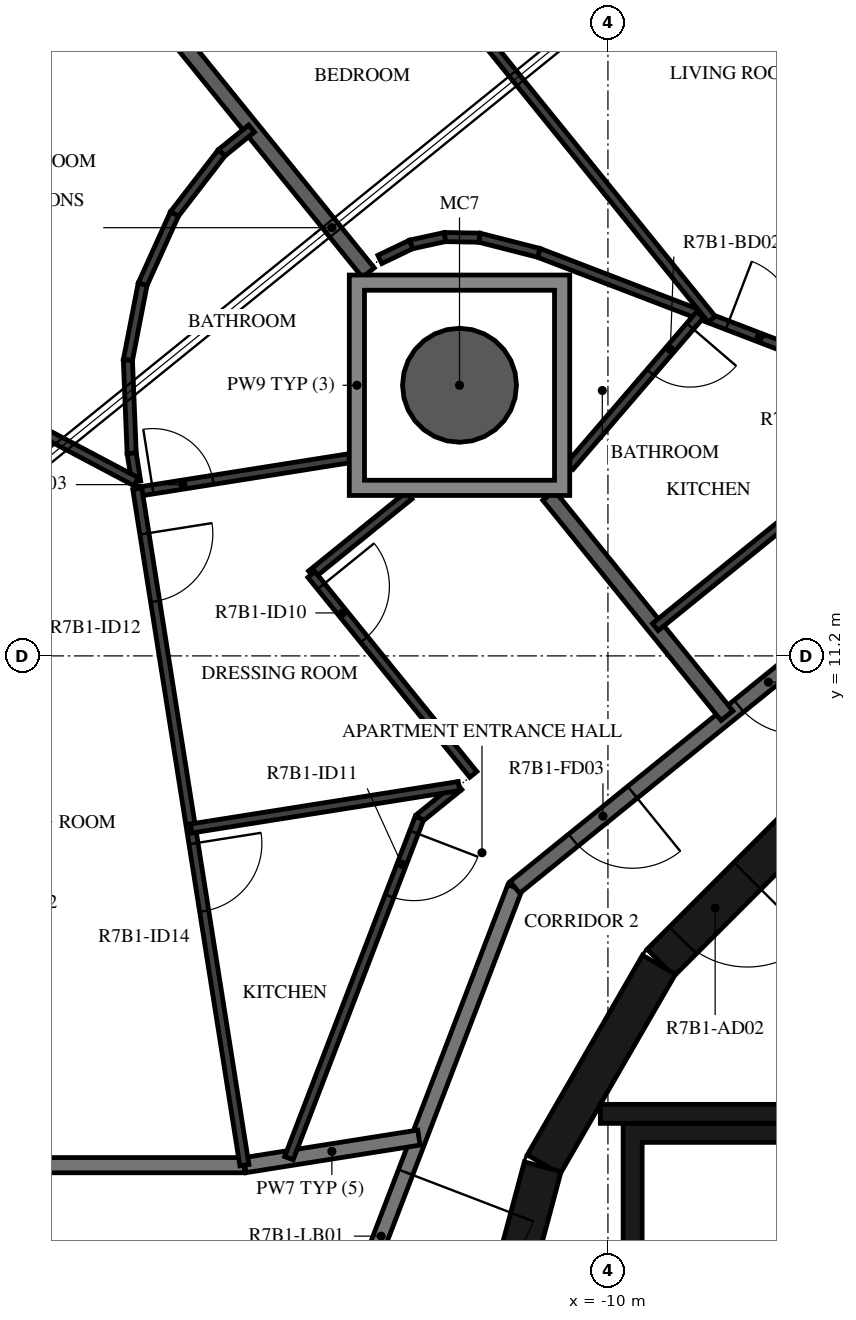
"""IFC4 building model, lengths in metres.
Left out: names, types, materials, properties, quantities, classifications, styles, units other than length and angle.
Written with IfcOpenShell. Run it as: python <this file> out.ifc"""

import sys

from ifc_helpers import new_model, si_unit, direction, frame, frame_2d, origin, origin_2d, place, context, subcontext, project, spatial, polyline, rectangle, hollow_circle, outline, extrude, element, fill, save


model = new_model("IFC4")
c1 = context("Model", 3, precision=1e-05, world=origin(), true_north=direction((0.0, 1.0)))
c2 = subcontext(c1, "Body", "Model", "MODEL_VIEW")
j1 = project(units=[si_unit("LENGTHUNIT", "METRE"), si_unit("PLANEANGLEUNIT", "RADIAN")], contexts=[c1])
p1 = place(None, origin())
s1 = spatial("IfcSite", under=j1, at=p1, CompositionType="ELEMENT")
p2 = place(p1, origin())
s2 = spatial("IfcBuilding", under=s1, at=p2, CompositionType="ELEMENT")
p3 = place(p2, frame((0.0, 0.0, 273.9)))
s3 = spatial("IfcBuildingStorey", under=s2, at=p3, CompositionType="ELEMENT", Elevation=273.9)
p4 = place(p3, frame((-11.953, 14.76, -0.38), z_axis=(0.0, 0.0, 1.0), x_axis=(1.0, 0.0, 0.0)))
e1 = element("IfcColumn", 1, at=p4, inside=s3, PredefinedType="COLUMN", context=c2, shape_type="SweptSolid", body=[
    extrude(hollow_circle(Radius=0.75, WallThickness=0.035, at=origin_2d()), origin(), (0.0, 0.0, 1.0), 3.5),
])
p5 = place(p3, frame((-7.164, 9.308, 0.0), z_axis=(0.0, 0.0, 1.0), x_axis=(-0.707106781187, -0.707106781187, 0.0)))
e2 = element("IfcWall", 2, at=p5, inside=s3, PredefinedType="SHEAR", context=c2, shape_type="SweptSolid", body=[
    extrude(rectangle(XDim=3.032, YDim=0.5, at=frame_2d((1.516, 0.0))), origin(), (0.0, 0.0, 1.0), 3.12),
])
p6 = place(p5, frame((1.416, 0.0, 0.0)))
e3 = element("IfcOpeningElement", 3, at=p6, cuts=e2, PredefinedType="OPENING", context=c2, shape_type="SweptSolid", body=[
    extrude(rectangle(XDim=1.2, YDim=2.1, at=frame_2d((0.6, 1.05))), frame((0.0, 0.26, 0.0), z_axis=(0.0, -1.0, 0.0), x_axis=(1.0, 0.0, 0.0)), (0.0, 0.0, 1.0), 0.52),
])
for number, where, z_axis, x_axis in (
    (4, (-9.329, 7.137, 0.0), (0.0, 0.0, 1.0), (-0.5, -0.866, 0.0)),
    (5, (-10.858, 4.479, 0.0), (0.0, 0.0, 1.0), (-0.259, -0.966, 0.0)),
):
    element("IfcWall", number, at=place(p3, frame(where, z_axis=z_axis, x_axis=x_axis)), inside=s3, PredefinedType="SHEAR", context=c2, shape_type="SweptSolid", body=[
        extrude(rectangle(XDim=3.033, YDim=0.5, at=frame_2d((1.516, 0.0))), origin(), (0.0, 0.0, 1.0), 3.12),
    ])
p7 = place(p3, frame((-7.0, 5.175, 0.0), z_axis=(0.0, 0.0, 1.0), x_axis=(-1.0, 0.0, 0.0)))
e6 = element("IfcWall", 6, at=p7, inside=s3, PredefinedType="SHEAR", context=c2, shape_type="SweptSolid", body=[
    extrude(rectangle(XDim=3.1, YDim=0.25, at=frame_2d((1.55, 0.0))), origin(), (0.0, 0.0, 1.0), 3.12),
])
p8 = place(p3, origin())
e7 = element("IfcWall", 7, at=p8, inside=s3, PredefinedType="SHEAR", context=c2, shape_type="SweptSolid", body=[
    extrude(outline(polyline([(-9.8, 1.9), (-9.55, 1.9), (-9.55, 4.8), (-5.5, 4.8), (-5.5, 1.9), (-5.25, 1.9), (-5.25, 4.8), (3.1, 4.8), (3.1, 1.9), (3.35, 1.9), (3.35, 4.8), (5.25, 4.8), (5.25, 1.9), (5.5, 1.9), (5.5, 4.8), (7.4, 4.8), (7.4, 1.9), (7.65, 1.9), (7.65, 4.8), (9.55, 4.8), (9.55, 1.9), (9.8, 1.9), (9.8, 4.8), (9.8, 5.05), (-9.8, 5.05), (-9.8, 4.8), (-9.8, 1.9)])), origin(), (0.0, 0.0, 1.0), 3.12),
])
p9 = place(p3, frame((-11.223, 8.154, 0.0), z_axis=(0.0, 0.0, 1.0), x_axis=(-0.358341090983, -0.93359073609, 0.0)))
e8 = element("IfcWall", 8, at=p9, inside=s3, PredefinedType="STANDARD", context=c2, shape_type="SweptSolid", body=[
    extrude(rectangle(XDim=7.181, YDim=0.2, at=frame_2d((3.59, 0.0))), origin(), (0.0, 0.0, 1.0), 3.12),
])
p10 = place(p9, frame((4.014, 0.0, 0.0)))
e9 = element("IfcOpeningElement", 9, at=p10, cuts=e8, PredefinedType="OPENING", context=c2, shape_type="SweptSolid", body=[
    extrude(rectangle(XDim=1.8, YDim=2.1, at=frame_2d((0.9, 1.05))), frame((0.0, 0.11, 0.0), z_axis=(0.0, -1.0, 0.0), x_axis=(1.0, 0.0, 0.0)), (0.0, 0.0, 1.0), 0.22),
])
p11 = place(p3, frame((-5.643, 12.673, 0.0), z_axis=(0.0, 0.0, 1.0), x_axis=(-0.777160148113, -0.629302871585, 0.0)))
e10 = element("IfcWall", 10, at=p11, inside=s3, PredefinedType="STANDARD", context=c2, shape_type="SweptSolid", body=[
    extrude(rectangle(XDim=7.181, YDim=0.2, at=frame_2d((3.59, 0.0))), origin(), (0.0, 0.0, 1.0), 3.12),
])
p12 = place(p11, frame((2.39, 0.0, 0.0)))
e11 = element("IfcOpeningElement", 11, at=p12, cuts=e10, PredefinedType="OPENING", context=c2, shape_type="SweptSolid", body=[
    extrude(rectangle(XDim=1.0, YDim=2.1, at=frame_2d((0.5, 1.05))), frame((0.0, 0.11, 0.0), z_axis=(0.0, -1.0, 0.0), x_axis=(1.0, 0.0, 0.0)), (0.0, 0.0, 1.0), 0.22),
])
p13 = place(p11, frame((5.192, 0.0, 0.0)))
e12 = element("IfcOpeningElement", 12, at=p13, cuts=e10, PredefinedType="OPENING", context=c2, shape_type="SweptSolid", body=[
    extrude(rectangle(XDim=1.0, YDim=2.1, at=frame_2d((0.5, 1.05))), frame((0.0, 0.11, 0.0), z_axis=(0.0, -1.0, 0.0), x_axis=(1.0, 0.0, 0.0)), (0.0, 0.0, 1.0), 0.22),
])
p14 = place(p3, frame((-12.487, 4.863, 0.0), z_axis=(0.0, 0.0, 1.0), x_axis=(-0.98769031179, -0.156422018898, 0.0)))
e13 = element("IfcWall", 13, at=p14, inside=s3, PredefinedType="STANDARD", context=c2, shape_type="SweptSolid", body=[
    extrude(rectangle(XDim=2.319, YDim=0.2, at=frame_2d((1.16, 0.0))), origin(), (0.0, 0.0, 1.0), 3.12),
])
p15 = place(p3, frame((-14.783, 4.5, 0.0), z_axis=(0.0, 0.0, 1.0), x_axis=(-1.0, 0.0, 0.0)))
e14 = element("IfcWall", 14, at=p15, inside=s3, PredefinedType="STANDARD", context=c2, shape_type="SweptSolid", body=[
    extrude(rectangle(XDim=3.645, YDim=0.2, at=frame_2d((1.822, 0.0))), origin(), (0.0, 0.0, 1.0), 3.12),
])
p16 = place(p3, frame((-10.779, 13.31, 0.0), z_axis=(0.0, 0.0, 1.0), x_axis=(0.62931692753, -0.777148766147, 0.0)))
e15 = element("IfcWall", 15, at=p16, inside=s3, PredefinedType="STANDARD", context=c2, shape_type="SweptSolid", body=[
    extrude(rectangle(XDim=3.727, YDim=0.2, at=frame_2d((1.864, 0.0))), origin(), (0.0, 0.0, 1.0), 3.12),
])
p17 = place(p3, frame((-16.953, 20.936, 0.0), z_axis=(0.0, 0.0, 1.0), x_axis=(0.629347053134, -0.77712437017, 0.0)))
e16 = element("IfcWall", 16, at=p17, inside=s3, PredefinedType="STANDARD", context=c2, shape_type="SweptSolid", body=[
    extrude(rectangle(XDim=6.04, YDim=0.2, at=frame_2d((3.02, 0.0))), origin(), (0.0, 0.0, 1.0), 3.12),
])
p18 = place(p3, frame((-6.274, 14.092, 0.0), z_axis=(0.0, 0.0, 1.0), x_axis=(-0.777162268892, -0.629300252511, 0.0)))
e17 = element("IfcWall", 17, at=p18, inside=s3, PredefinedType="PARTITIONING", context=c2, shape_type="SweptSolid", body=[
    extrude(rectangle(XDim=3.992, YDim=0.12, at=frame_2d((1.996, 0.0))), origin(), (0.0, 0.0, 1.0), 3.12),
])
p19 = place(p18, frame((0.2, 0.0, 0.0)))
e18 = element("IfcOpeningElement", 18, at=p19, cuts=e17, PredefinedType="OPENING", context=c2, shape_type="SweptSolid", body=[
    extrude(rectangle(XDim=0.9, YDim=2.1, at=frame_2d((0.45, 1.05))), frame((0.0, 0.07, 0.0), z_axis=(0.0, -1.0, 0.0), x_axis=(1.0, 0.0, 0.0)), (0.0, 0.0, 1.0), 0.14),
])
p20 = place(p3, frame((-10.91, 16.502, 0.0), z_axis=(0.0, 0.0, 1.0), x_axis=(0.933584453869, -0.358357457707, 0.0)))
e19 = element("IfcWall", 19, at=p20, inside=s3, PredefinedType="PARTITIONING", context=c2, shape_type="SweptSolid", body=[
    extrude(rectangle(XDim=6.212, YDim=0.12, at=frame_2d((3.106, 0.0))), origin(), (0.0, 0.0, 1.0), 3.12),
])
p21 = place(p20, frame((2.657, 0.0, 0.0)))
e20 = element("IfcOpeningElement", 20, at=p21, cuts=e19, PredefinedType="OPENING", context=c2, shape_type="SweptSolid", body=[
    extrude(rectangle(XDim=0.9, YDim=2.1, at=frame_2d((0.45, 1.05))), frame((0.0, 0.07, 0.0), z_axis=(0.0, -1.0, 0.0), x_axis=(1.0, 0.0, 0.0)), (0.0, 0.0, 1.0), 0.14),
])
p22 = place(p3, frame((-14.132, 22.418, 0.0), z_axis=(0.0, 0.0, 1.0), x_axis=(0.629309172704, -0.77715504576, 0.0)))
e21 = element("IfcWall", 21, at=p22, inside=s3, PredefinedType="PARTITIONING", context=c2, shape_type="SweptSolid", body=[
    extrude(rectangle(XDim=8.736, YDim=0.12, at=frame_2d((4.368, 0.0))), origin(), (0.0, 0.0, 1.0), 3.12),
])
p23 = place(p22, frame((0.4, 0.0, 0.0)))
e22 = element("IfcOpeningElement", 22, at=p23, cuts=e21, PredefinedType="OPENING", context=c2, shape_type="SweptSolid", body=[
    extrude(rectangle(XDim=0.9, YDim=2.1, at=frame_2d((0.45, 1.05))), frame((0.0, 0.07, 0.0), z_axis=(0.0, -1.0, 0.0), x_axis=(1.0, 0.0, 0.0)), (0.0, 0.0, 1.0), 0.14),
])
p24 = place(p3, frame((-8.788, 15.688, 0.0), z_axis=(0.0, 0.0, 1.0), x_axis=(-0.652090514391, -0.758141122115, 0.0)))
e23 = element("IfcWall", 23, at=p24, inside=s3, PredefinedType="PARTITIONING", context=c2, shape_type="SweptSolid", body=[
    extrude(rectangle(XDim=2.629, YDim=0.12, at=frame_2d((1.314, 0.0))), origin(), (0.0, 0.0, 1.0), 3.12),
])
p25 = place(p24, frame((0.2, 0.0, 0.0)))
e24 = element("IfcOpeningElement", 24, at=p25, cuts=e23, PredefinedType="OPENING", context=c2, shape_type="SweptSolid", body=[
    extrude(rectangle(XDim=0.8, YDim=2.1, at=frame_2d((0.4, 1.05))), frame((0.0, 0.07, 0.0), z_axis=(0.0, -1.0, 0.0), x_axis=(1.0, 0.0, 0.0)), (0.0, 0.0, 1.0), 0.14),
])
p26 = place(p3, frame((-10.91, 16.502, 0.0), z_axis=(0.0, 0.0, 1.0), x_axis=(-0.96886520615, 0.247588796823, 0.0)))
e25 = element("IfcWall", 25, at=p26, inside=s3, PredefinedType="PARTITIONING", context=c2, shape_type="SweptSolid", body=[
    extrude(rectangle(XDim=0.807, YDim=0.12, at=frame_2d((0.403, 0.0))), origin(), (0.0, 0.0, 1.0), 3.12),
])
p27 = place(p3, frame((-11.691, 16.702, 0.0), z_axis=(0.0, 0.0, 1.0), x_axis=(-0.999843155249, 0.017710587291, 0.0)))
e26 = element("IfcWall", 26, at=p27, inside=s3, PredefinedType="PARTITIONING", context=c2, shape_type="SweptSolid", body=[
    extrude(rectangle(XDim=0.455, YDim=0.12, at=frame_2d((0.228, 0.0))), origin(), (0.0, 0.0, 1.0), 3.12),
])
p28 = place(p3, frame((-12.146, 16.71, 0.0), z_axis=(0.0, 0.0, 1.0), x_axis=(-0.976826470165, -0.21403281801, 0.0)))
e27 = element("IfcWall", 27, at=p28, inside=s3, PredefinedType="PARTITIONING", context=c2, shape_type="SweptSolid", body=[
    extrude(rectangle(XDim=0.455, YDim=0.12, at=frame_2d((0.228, 0.0))), origin(), (0.0, 0.0, 1.0), 3.12),
])
p29 = place(p3, frame((-12.591, 16.613, 0.0), z_axis=(0.0, 0.0, 1.0), x_axis=(-0.901405666701, -0.432975546699, 0.0)))
e28 = element("IfcWall", 28, at=p29, inside=s3, PredefinedType="PARTITIONING", context=c2, shape_type="SweptSolid", body=[
    extrude(rectangle(XDim=0.455, YDim=0.12, at=frame_2d((0.227, 0.0))), origin(), (0.0, 0.0, 1.0), 3.12),
])
p30 = place(p3, frame((-12.616, 13.311, 0.0), z_axis=(0.0, 0.0, 1.0), x_axis=(-0.7771657422, -0.629295963082, 0.0)))
e29 = element("IfcWall", 29, at=p30, inside=s3, PredefinedType="PARTITIONING", context=c2, shape_type="SweptSolid", body=[
    extrude(rectangle(XDim=1.653, YDim=0.12, at=frame_2d((0.826, 0.0))), origin(), (0.0, 0.0, 1.0), 3.12),
])
p31 = place(p3, frame((-13.901, 12.271, 0.0), z_axis=(0.0, 0.0, 1.0), x_axis=(0.62932066967, -0.777145735835, 0.0)))
e30 = element("IfcWall", 30, at=p31, inside=s3, PredefinedType="PARTITIONING", context=c2, shape_type="SweptSolid", body=[
    extrude(rectangle(XDim=3.384, YDim=0.12, at=frame_2d((1.692, 0.0))), origin(), (0.0, 0.0, 1.0), 3.12),
])
p32 = place(p31, frame((0.2, 0.0, 0.0)))
e31 = element("IfcOpeningElement", 31, at=p32, cuts=e30, PredefinedType="OPENING", context=c2, shape_type="SweptSolid", body=[
    extrude(rectangle(XDim=0.9, YDim=2.1, at=frame_2d((0.45, 1.05))), frame((0.0, 0.07, 0.0), z_axis=(0.0, -1.0, 0.0), x_axis=(1.0, 0.0, 0.0)), (0.0, 0.0, 1.0), 0.14),
])
p33 = place(p3, frame((-11.96, 9.487, 0.0), z_axis=(0.0, 0.0, 1.0), x_axis=(-0.777219341678, -0.62922976322, 0.0)))
e32 = element("IfcWall", 32, at=p33, inside=s3, PredefinedType="PARTITIONING", context=c2, shape_type="SweptSolid", body=[
    extrude(rectangle(XDim=0.668, YDim=0.12, at=frame_2d((0.334, 0.0))), origin(), (0.0, 0.0, 1.0), 3.12),
])
p34 = place(p3, frame((-12.479, 9.067, 0.0), z_axis=(0.0, 0.0, 1.0), x_axis=(-0.358402229057, -0.933567267104, 0.0)))
e33 = element("IfcWall", 33, at=p34, inside=s3, PredefinedType="PARTITIONING", context=c2, shape_type="SweptSolid", body=[
    extrude(rectangle(XDim=4.793, YDim=0.12, at=frame_2d((2.397, 0.0))), origin(), (0.0, 0.0, 1.0), 3.12),
])
p35 = place(p34, frame((0.2, 0.0, 0.0)))
e34 = element("IfcOpeningElement", 34, at=p35, cuts=e33, PredefinedType="OPENING", context=c2, shape_type="SweptSolid", body=[
    extrude(rectangle(XDim=0.9, YDim=2.1, at=frame_2d((0.45, 1.05))), frame((0.0, 0.07, 0.0), z_axis=(0.0, -1.0, 0.0), x_axis=(1.0, 0.0, 0.0)), (0.0, 0.0, 1.0), 0.14),
])
p36 = place(p3, frame((-14.688, 18.138, 0.0), z_axis=(0.0, 0.0, 1.0), x_axis=(-0.777009819755, -0.629488474879, 0.0)))
e35 = element("IfcWall", 35, at=p36, inside=s3, PredefinedType="PARTITIONING", context=c2, shape_type="SweptSolid", body=[
    extrude(rectangle(XDim=0.508, YDim=0.12, at=frame_2d((0.254, 0.0))), origin(), (0.0, 0.0, 1.0), 3.12),
])
p37 = place(p3, frame((-15.083, 17.818, 0.0), z_axis=(0.0, 0.0, 1.0), x_axis=(-0.611091802574, -0.791559731686, 0.0)))
e36 = element("IfcWall", 36, at=p37, inside=s3, PredefinedType="PARTITIONING", context=c2, shape_type="SweptSolid", body=[
    extrude(rectangle(XDim=1.016, YDim=0.12, at=frame_2d((0.508, 0.0))), origin(), (0.0, 0.0, 1.0), 3.12),
])
p38 = place(p3, frame((-15.703, 17.014, 0.0), z_axis=(0.0, 0.0, 1.0), x_axis=(-0.411973085874, -0.911196014322, 0.0)))
e37 = element("IfcWall", 37, at=p38, inside=s3, PredefinedType="PARTITIONING", context=c2, shape_type="SweptSolid", body=[
    extrude(rectangle(XDim=1.016, YDim=0.12, at=frame_2d((0.508, 0.0))), origin(), (0.0, 0.0, 1.0), 3.12),
])
p39 = place(p3, frame((-16.122, 16.088, 0.0), z_axis=(0.0, 0.0, 1.0), x_axis=(-0.191030445301, -0.981584112019, 0.0)))
e38 = element("IfcWall", 38, at=p39, inside=s3, PredefinedType="PARTITIONING", context=c2, shape_type="SweptSolid", body=[
    extrude(rectangle(XDim=1.016, YDim=0.12, at=frame_2d((0.508, 0.0))), origin(), (0.0, 0.0, 1.0), 3.12),
])
p40 = place(p3, frame((-16.316, 15.091, 0.0), z_axis=(0.0, 0.0, 1.0), x_axis=(0.040786423131, -0.999167887639, 0.0)))
e39 = element("IfcWall", 39, at=p40, inside=s3, PredefinedType="PARTITIONING", context=c2, shape_type="SweptSolid", body=[
    extrude(rectangle(XDim=1.227, YDim=0.12, at=frame_2d((0.614, 0.0))), origin(), (0.0, 0.0, 1.0), 3.12),
])
p41 = place(p3, frame((-16.266, 13.865, 0.0), z_axis=(0.0, 0.0, 1.0), x_axis=(0.156757556272, -0.987637113798, 0.0)))
e40 = element("IfcWall", 40, at=p41, inside=s3, PredefinedType="PARTITIONING", context=c2, shape_type="SweptSolid", body=[
    extrude(rectangle(XDim=0.378, YDim=0.12, at=frame_2d((0.189, 0.0))), origin(), (0.0, 0.0, 1.0), 3.12),
])
p42 = place(p3, frame((-16.186, 13.359, 0.0), z_axis=(0.0, 0.0, 1.0), x_axis=(0.987680631298, 0.156483131865, 0.0)))
e41 = element("IfcWall", 41, at=p42, inside=s3, PredefinedType="PARTITIONING", context=c2, shape_type="SweptSolid", body=[
    extrude(rectangle(XDim=2.818, YDim=0.12, at=frame_2d((1.409, 0.0))), origin(), (0.0, 0.0, 1.0), 3.12),
])
p43 = place(p42, frame((0.2, 0.0, 0.0)))
e42 = element("IfcOpeningElement", 42, at=p43, cuts=e41, PredefinedType="OPENING", context=c2, shape_type="SweptSolid", body=[
    extrude(rectangle(XDim=0.8, YDim=2.1, at=frame_2d((0.4, 1.05))), frame((0.0, 0.07, 0.0), z_axis=(0.0, -1.0, 0.0), x_axis=(1.0, 0.0, 0.0)), (0.0, 0.0, 1.0), 0.14),
])
p44 = place(p3, frame((-19.913, 15.454, 0.0), z_axis=(0.0, 0.0, 1.0), x_axis=(0.883751094582, -0.467957266024, 0.0)))
e43 = element("IfcWall", 43, at=p44, inside=s3, PredefinedType="PARTITIONING", context=c2, shape_type="SweptSolid", body=[
    extrude(rectangle(XDim=4.194, YDim=0.12, at=frame_2d((2.097, 0.0))), origin(), (0.0, 0.0, 1.0), 3.12),
])
p45 = place(p44, frame((0.4, 0.0, 0.0)))
e44 = element("IfcOpeningElement", 44, at=p45, cuts=e43, PredefinedType="OPENING", context=c2, shape_type="SweptSolid", body=[
    extrude(rectangle(XDim=0.9, YDim=2.1, at=frame_2d((0.45, 1.05))), frame((0.0, 0.07, 0.0), z_axis=(0.0, -1.0, 0.0), x_axis=(1.0, 0.0, 0.0)), (0.0, 0.0, 1.0), 0.14),
])
p46 = place(p3, frame((-16.192, 13.399, 0.0), z_axis=(0.0, 0.0, 1.0), x_axis=(0.156405047803, -0.987692999379, 0.0)))
e45 = element("IfcWall", 45, at=p46, inside=s3, PredefinedType="PARTITIONING", context=c2, shape_type="SweptSolid", body=[
    extrude(rectangle(XDim=9.01, YDim=0.12, at=frame_2d((4.505, 0.0))), origin(), (0.0, 0.0, 1.0), 3.12),
])
p47 = place(p46, frame((0.6, 0.0, 0.0)))
e46 = element("IfcOpeningElement", 46, at=p47, cuts=e45, PredefinedType="OPENING", context=c2, shape_type="SweptSolid", body=[
    extrude(rectangle(XDim=0.9, YDim=2.1, at=frame_2d((0.45, 1.05))), frame((0.0, 0.07, 0.0), z_axis=(0.0, -1.0, 0.0), x_axis=(1.0, 0.0, 0.0)), (0.0, 0.0, 1.0), 0.14),
])
p48 = place(p46, frame((4.725, 0.0, 0.0)))
e47 = element("IfcOpeningElement", 47, at=p48, cuts=e45, PredefinedType="OPENING", context=c2, shape_type="SweptSolid", body=[
    extrude(rectangle(XDim=0.9, YDim=2.1, at=frame_2d((0.45, 1.05))), frame((0.0, 0.07, 0.0), z_axis=(0.0, -1.0, 0.0), x_axis=(1.0, 0.0, 0.0)), (0.0, 0.0, 1.0), 0.14),
])
p49 = place(p3, frame((-15.484, 8.929, 0.0), z_axis=(0.0, 0.0, 1.0), x_axis=(0.987689619983, 0.156426387092, 0.0)))
e48 = element("IfcWall", 48, at=p49, inside=s3, PredefinedType="PARTITIONING", context=c2, shape_type="SweptSolid", body=[
    extrude(rectangle(XDim=3.568, YDim=0.12, at=frame_2d((1.784, 0.0))), origin(), (0.0, 0.0, 1.0), 3.12),
])
p50 = place(p3, origin())
e49 = element("IfcWall", 49, at=p50, inside=s3, PredefinedType="STANDARD", context=c2, shape_type="SweptSolid", body=[
    extrude(outline(polyline([(-10.503, 16.21), (-10.503, 13.311), (-13.403, 13.311), (-13.403, 16.21), (-10.503, 16.21)]), holes=[polyline([(-13.203, 13.51), (-10.703, 13.51), (-10.703, 16.01), (-13.203, 16.01), (-13.203, 13.51)])]), origin(), (0.0, 0.0, 1.0), 3.12),
])
p51 = place(p6, origin())
e50 = element("IfcDoor", 50, at=p51, inside=s3, OperationType="SINGLE_SWING_RIGHT", PredefinedType="DOOR", context=c2, shape_type="SweptSolid", body=[
    extrude(rectangle(XDim=1.2, YDim=2.1, at=frame_2d((0.6, 1.05))), frame((0.0, 0.025, 0.0), z_axis=(0.0, -1.0, 0.0), x_axis=(1.0, 0.0, 0.0)), (0.0, 0.0, 1.0), 0.05),
])
fill(e3, e50)
p52 = place(p12, origin())
e51 = element("IfcDoor", 51, at=p52, inside=s3, OperationType="SINGLE_SWING_RIGHT", PredefinedType="DOOR", context=c2, shape_type="SweptSolid", body=[
    extrude(rectangle(XDim=1.0, YDim=2.1, at=frame_2d((0.5, 1.05))), frame((0.0, 0.025, 0.0), z_axis=(0.0, -1.0, 0.0), x_axis=(1.0, 0.0, 0.0)), (0.0, 0.0, 1.0), 0.05),
])
fill(e11, e51)
p53 = place(p25, origin())
e52 = element("IfcDoor", 52, at=p53, inside=s3, OperationType="SINGLE_SWING_RIGHT", PredefinedType="DOOR", context=c2, shape_type="SweptSolid", body=[
    extrude(rectangle(XDim=0.8, YDim=2.1, at=frame_2d((0.4, 1.05))), frame((0.0, 0.025, 0.0), z_axis=(0.0, -1.0, 0.0), x_axis=(1.0, 0.0, 0.0)), (0.0, 0.0, 1.0), 0.05),
])
fill(e24, e52)
p54 = place(p21, origin())
e53 = element("IfcDoor", 53, at=p54, inside=s3, OperationType="SINGLE_SWING_LEFT", PredefinedType="DOOR", context=c2, shape_type="SweptSolid", body=[
    extrude(rectangle(XDim=0.9, YDim=2.1, at=frame_2d((0.45, 1.05))), frame((0.0, 0.025, 0.0), z_axis=(0.0, -1.0, 0.0), x_axis=(1.0, 0.0, 0.0)), (0.0, 0.0, 1.0), 0.05),
])
fill(e20, e53)
p55 = place(p13, origin())
e54 = element("IfcDoor", 54, at=p55, inside=s3, OperationType="SINGLE_SWING_LEFT", PredefinedType="DOOR", context=c2, shape_type="SweptSolid", body=[
    extrude(rectangle(XDim=1.0, YDim=2.1, at=frame_2d((0.5, 1.05))), frame((0.0, 0.025, 0.0), z_axis=(0.0, -1.0, 0.0), x_axis=(1.0, 0.0, 0.0)), (0.0, 0.0, 1.0), 0.05),
])
fill(e12, e54)
p56 = place(p32, origin())
e55 = element("IfcDoor", 55, at=p56, inside=s3, OperationType="SINGLE_SWING_LEFT", PredefinedType="DOOR", context=c2, shape_type="SweptSolid", body=[
    extrude(rectangle(XDim=0.9, YDim=2.1, at=frame_2d((0.45, 1.05))), frame((0.0, 0.025, 0.0), z_axis=(0.0, -1.0, 0.0), x_axis=(1.0, 0.0, 0.0)), (0.0, 0.0, 1.0), 0.05),
])
fill(e31, e55)
p57 = place(p35, origin())
e56 = element("IfcDoor", 56, at=p57, inside=s3, OperationType="SINGLE_SWING_LEFT", PredefinedType="DOOR", context=c2, shape_type="SweptSolid", body=[
    extrude(rectangle(XDim=0.9, YDim=2.1, at=frame_2d((0.45, 1.05))), frame((0.0, 0.025, 0.0), z_axis=(0.0, -1.0, 0.0), x_axis=(1.0, 0.0, 0.0)), (0.0, 0.0, 1.0), 0.05),
])
fill(e34, e56)
p58 = place(p43, origin())
e57 = element("IfcDoor", 57, at=p58, inside=s3, OperationType="SINGLE_SWING_LEFT", PredefinedType="DOOR", context=c2, shape_type="SweptSolid", body=[
    extrude(rectangle(XDim=0.8, YDim=2.1, at=frame_2d((0.4, 1.05))), frame((0.0, 0.025, 0.0), z_axis=(0.0, -1.0, 0.0), x_axis=(1.0, 0.0, 0.0)), (0.0, 0.0, 1.0), 0.05),
])
fill(e42, e57)
p59 = place(p47, origin())
e58 = element("IfcDoor", 58, at=p59, inside=s3, OperationType="SINGLE_SWING_LEFT", PredefinedType="DOOR", context=c2, shape_type="SweptSolid", body=[
    extrude(rectangle(XDim=0.9, YDim=2.1, at=frame_2d((0.45, 1.05))), frame((0.0, 0.025, 0.0), z_axis=(0.0, -1.0, 0.0), x_axis=(1.0, 0.0, 0.0)), (0.0, 0.0, 1.0), 0.05),
])
fill(e46, e58)
p60 = place(p48, origin())
e59 = element("IfcDoor", 59, at=p60, inside=s3, OperationType="SINGLE_SWING_RIGHT", PredefinedType="DOOR", context=c2, shape_type="SweptSolid", body=[
    extrude(rectangle(XDim=0.9, YDim=2.1, at=frame_2d((0.45, 1.05))), frame((0.0, 0.025, 0.0), z_axis=(0.0, -1.0, 0.0), x_axis=(1.0, 0.0, 0.0)), (0.0, 0.0, 1.0), 0.05),
])
fill(e47, e59)
p61 = place(p10, origin())
e60 = element("IfcDoor", 60, at=p61, inside=s3, OperationType="DOUBLE_DOOR_SINGLE_SWING", PredefinedType="DOOR", context=c2, shape_type="SweptSolid", body=[
    extrude(rectangle(XDim=1.8, YDim=2.1, at=frame_2d((0.9, 1.05))), frame((0.0, 0.025, 0.0), z_axis=(0.0, -1.0, 0.0), x_axis=(1.0, 0.0, 0.0)), (0.0, 0.0, 1.0), 0.05),
])
fill(e9, e60)
save(model, sys.argv[1])
